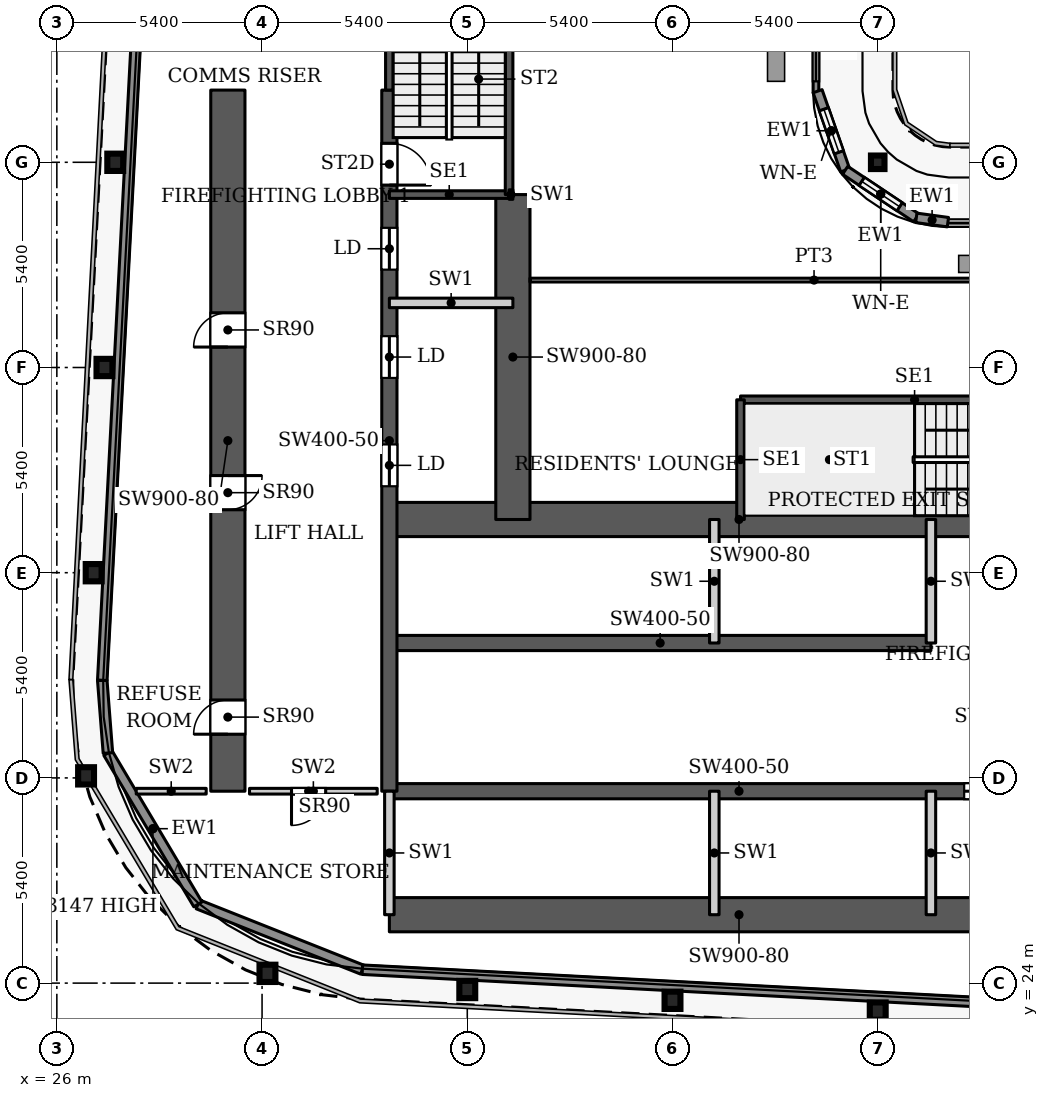
"""IFC4 building model, lengths in metres.
Left out: names, types, materials, properties, quantities, classifications, styles, units other than length and angle.
Written with IfcOpenShell. Run it as: python <this file> out.ifc"""

import sys

from ifc_helpers import new_model, si_unit, direction, frame, frame_2d, origin, origin_2d, place, context, subcontext, project, spatial, rectangle, hollow_rectangle, i_section, extrude, source, transform, mapped, element, fill, save


model = new_model("IFC4")
c1 = context("Model", 3, precision=1e-05, world=origin(), true_north=direction((0.0, 1.0)))
c2 = subcontext(c1, "Body", "Model", "MODEL_VIEW")
j1 = project(units=[si_unit("LENGTHUNIT", "METRE"), si_unit("PLANEANGLEUNIT", "RADIAN")], contexts=[c1])
p1 = place(None, origin())
s1 = spatial("IfcSite", under=j1, at=p1, CompositionType="ELEMENT")
p2 = place(p1, origin())
s2 = spatial("IfcBuilding", under=s1, at=p2, CompositionType="ELEMENT")
p3 = place(p2, frame((0.0, 0.0, 129.2)))
s3 = spatial("IfcBuildingStorey", under=s2, at=p3, CompositionType="ELEMENT", Elevation=129.2)
for number, where, z_axis, x_axis in (
    (1, (47.6, 23.264, 0.0), (0.0, 0.0, 1.0), (1.0, 0.0, 0.0)),
    (2, (42.2, 23.548, 0.0), (0.0, 0.0, 1.0), (1.0, 0.0, 0.0)),
    (3, (36.8, 23.832, 0.0), (0.0, 0.0, 1.0), (1.0, 0.0, 0.0)),
    (4, (31.542, 24.257, 0.0), (0.0, 0.0, 1.0), (1.0, 0.0, 0.0)),
    (5, (26.769, 29.454, 0.0), (0.0, 0.0, 1.0), (1.0, 0.0, 0.0)),
    (6, (26.969, 34.8, 0.0), (0.0, 0.0, 1.0), (1.0, 0.0, 0.0)),
    (7, (27.253, 40.2, 0.0), (0.0, 0.0, 1.0), (1.0, 0.0, 0.0)),
    (8, (27.537, 45.6, 0.0), (0.0, 0.0, 1.0), (1.0, 0.0, 0.0)),
):
    element("IfcColumn", number, at=place(p3, frame(where, z_axis=z_axis, x_axis=x_axis)), inside=s3, PredefinedType="COLUMN", context=c2, shape_type="SweptSolid", body=[
        extrude(i_section(OverallWidth=0.418, OverallDepth=0.455, WebThickness=0.042, FlangeThickness=0.068, FilletRadius=0.014, at=origin_2d()), origin(), (0.0, 0.0, 1.0), 3.9),
    ])
p4 = place(p3, frame((47.6, 45.6, 0.0), z_axis=(0.0, 0.0, 1.0), x_axis=(1.0, 0.0, 0.0)))
e9 = element("IfcColumn", 9, at=p4, inside=s3, PredefinedType="COLUMN", context=c2, shape_type="SweptSolid", body=[
    extrude(hollow_rectangle(XDim=0.356, YDim=0.356, WallThickness=0.016, InnerFilletRadius=0.016, OuterFilletRadius=0.032, at=origin_2d()), origin(), (0.0, 0.0, 1.0), 3.9),
])
p5 = place(p3, frame((34.75, 25.8, 0.0), z_axis=(0.0, 0.0, 1.0), x_axis=(1.0, 0.0, 0.0)))
e10 = element("IfcWall", 10, at=p5, inside=s3, PredefinedType="SHEAR", context=c2, shape_type="SweptSolid", body=[
    extrude(rectangle(XDim=18.4, YDim=0.9, at=frame_2d((9.2, 0.0))), origin(), (0.0, 0.0, 1.0), 3.9),
])
p6 = place(p3, frame((34.75, 29.05, 0.0), z_axis=(0.0, 0.0, 1.0), x_axis=(1.0, 0.0, 0.0)))
e11 = element("IfcWall", 11, at=p6, inside=s3, PredefinedType="SHEAR", context=c2, shape_type="SweptSolid", body=[
    extrude(rectangle(XDim=18.4, YDim=0.4, at=frame_2d((9.2, 0.0))), origin(), (0.0, 0.0, 1.0), 3.9),
])
p7 = place(p6, frame((15.125, 0.0, 0.0)))
e12 = element("IfcOpeningElement", 12, at=p7, cuts=e11, PredefinedType="OPENING", context=c2, shape_type="SweptSolid", body=[
    extrude(rectangle(XDim=1.1, YDim=2.2, at=frame_2d((0.55, 1.1))), frame((0.0, 0.21, 0.0), z_axis=(0.0, -1.0, 0.0), x_axis=(1.0, 0.0, 0.0)), (0.0, 0.0, 1.0), 0.42),
])
p8 = place(p3, frame((34.75, 32.95, 0.0), z_axis=(0.0, 0.0, 1.0), x_axis=(1.0, 0.0, 0.0)))
e13 = element("IfcWall", 13, at=p8, inside=s3, PredefinedType="SHEAR", context=c2, shape_type="SweptSolid", body=[
    extrude(rectangle(XDim=14.25, YDim=0.4, at=frame_2d((7.125, 0.0))), origin(), (0.0, 0.0, 1.0), 3.9),
])
p9 = place(p3, frame((34.75, 36.2, 0.0), z_axis=(0.0, 0.0, 1.0), x_axis=(1.0, 0.0, 0.0)))
e14 = element("IfcWall", 14, at=p9, inside=s3, PredefinedType="SHEAR", context=c2, shape_type="SweptSolid", body=[
    extrude(rectangle(XDim=18.4, YDim=0.9, at=frame_2d((9.2, 0.0))), origin(), (0.0, 0.0, 1.0), 3.9),
])
p10 = place(p9, frame((16.9, 0.0, 0.0)))
e15 = element("IfcOpeningElement", 15, at=p10, cuts=e14, PredefinedType="OPENING", context=c2, shape_type="SweptSolid", body=[
    extrude(rectangle(XDim=1.0, YDim=2.2, at=frame_2d((0.5, 1.1))), frame((0.0, 0.46, 0.0), z_axis=(0.0, -1.0, 0.0), x_axis=(1.0, 0.0, 0.0)), (0.0, 0.0, 1.0), 0.92),
])
p11 = place(p3, frame((34.75, 29.05, 0.0), z_axis=(0.0, 0.0, 1.0), x_axis=(0.0, 1.0, 0.0)))
e16 = element("IfcWall", 16, at=p11, inside=s3, PredefinedType="SHEAR", context=c2, shape_type="SweptSolid", body=[
    extrude(rectangle(XDim=18.45, YDim=0.4, at=frame_2d((9.225, 0.0))), origin(), (0.0, 0.0, 1.0), 3.9),
])
p12 = place(p11, frame((8.025, 0.0, 0.0)))
e17 = element("IfcOpeningElement", 17, at=p12, cuts=e16, PredefinedType="OPENING", context=c2, shape_type="SweptSolid", body=[
    extrude(rectangle(XDim=1.1, YDim=2.2, at=frame_2d((0.55, 1.1))), frame((0.0, 0.21, 0.0), z_axis=(0.0, -1.0, 0.0), x_axis=(1.0, 0.0, 0.0)), (0.0, 0.0, 1.0), 0.42),
])
p13 = place(p11, frame((10.875, 0.0, 0.0)))
e18 = element("IfcOpeningElement", 18, at=p13, cuts=e16, PredefinedType="OPENING", context=c2, shape_type="SweptSolid", body=[
    extrude(rectangle(XDim=1.1, YDim=2.2, at=frame_2d((0.55, 1.1))), frame((0.0, 0.21, 0.0), z_axis=(0.0, -1.0, 0.0), x_axis=(1.0, 0.0, 0.0)), (0.0, 0.0, 1.0), 0.42),
])
p14 = place(p11, frame((13.725, 0.0, 0.0)))
e19 = element("IfcOpeningElement", 19, at=p14, cuts=e16, PredefinedType="OPENING", context=c2, shape_type="SweptSolid", body=[
    extrude(rectangle(XDim=1.1, YDim=2.2, at=frame_2d((0.55, 1.1))), frame((0.0, 0.21, 0.0), z_axis=(0.0, -1.0, 0.0), x_axis=(1.0, 0.0, 0.0)), (0.0, 0.0, 1.0), 0.42),
])
p15 = place(p11, frame((15.95, 0.0, 0.0)))
e20 = element("IfcOpeningElement", 20, at=p15, cuts=e16, PredefinedType="OPENING", context=c2, shape_type="SweptSolid", body=[
    extrude(rectangle(XDim=1.1, YDim=2.2, at=frame_2d((0.55, 1.1))), frame((0.0, 0.21, 0.0), z_axis=(0.0, -1.0, 0.0), x_axis=(1.0, 0.0, 0.0)), (0.0, 0.0, 1.0), 0.42),
])
p16 = place(p3, frame((38.0, 36.2, 0.0), z_axis=(0.0, 0.0, 1.0), x_axis=(0.0, 1.0, 0.0)))
e21 = element("IfcWall", 21, at=p16, inside=s3, PredefinedType="SHEAR", context=c2, shape_type="SweptSolid", body=[
    extrude(rectangle(XDim=8.55, YDim=0.9, at=frame_2d((4.275, 0.0))), origin(), (0.0, 0.0, 1.0), 3.9),
])
p17 = place(p3, frame((30.5, 29.05, 0.0), z_axis=(0.0, 0.0, 1.0), x_axis=(0.0, 1.0, 0.0)))
e22 = element("IfcWall", 22, at=p17, inside=s3, PredefinedType="SHEAR", context=c2, shape_type="SweptSolid", body=[
    extrude(rectangle(XDim=18.45, YDim=0.9, at=frame_2d((9.225, 0.0))), origin(), (0.0, 0.0, 1.0), 3.9),
])
p18 = place(p17, frame((1.5, 0.0, 0.0)))
e23 = element("IfcOpeningElement", 23, at=p18, cuts=e22, PredefinedType="OPENING", context=c2, shape_type="SweptSolid", body=[
    extrude(rectangle(XDim=0.9, YDim=2.2, at=frame_2d((0.45, 1.1))), frame((0.0, 0.46, 0.0), z_axis=(0.0, -1.0, 0.0), x_axis=(1.0, 0.0, 0.0)), (0.0, 0.0, 1.0), 0.92),
])
p19 = place(p17, frame((7.406, 0.0, 0.0)))
e24 = element("IfcOpeningElement", 24, at=p19, cuts=e22, PredefinedType="OPENING", context=c2, shape_type="SweptSolid", body=[
    extrude(rectangle(XDim=0.9, YDim=2.2, at=frame_2d((0.45, 1.1))), frame((0.0, 0.46, 0.0), z_axis=(0.0, -1.0, 0.0), x_axis=(1.0, 0.0, 0.0)), (0.0, 0.0, 1.0), 0.92),
])
p20 = place(p17, frame((11.688, 0.0, 0.0)))
e25 = element("IfcOpeningElement", 25, at=p20, cuts=e22, PredefinedType="OPENING", context=c2, shape_type="SweptSolid", body=[
    extrude(rectangle(XDim=0.9, YDim=2.2, at=frame_2d((0.45, 1.1))), frame((0.0, 0.46, 0.0), z_axis=(0.0, -1.0, 0.0), x_axis=(1.0, 0.0, 0.0)), (0.0, 0.0, 1.0), 0.92),
])
p21 = place(p3, frame((34.039, 24.353, 0.0), z_axis=(0.0, 0.0, 1.0), x_axis=(-0.929352825399, 0.369192803184, 0.0)))
e26 = element("IfcWall", 26, at=p21, inside=s3, PredefinedType="SOLIDWALL", context=c2, shape_type="SweptSolid", body=[
    extrude(rectangle(XDim=4.656, YDim=0.25, at=frame_2d((2.328, 0.0))), origin(), (0.0, 0.0, 1.0), 3.75),
])
p22 = place(p3, frame((29.712, 26.072, 0.0), z_axis=(0.0, 0.0, 1.0), x_axis=(-0.511028049012, 0.859564036662, 0.0)))
e27 = element("IfcWall", 27, at=p22, inside=s3, PredefinedType="SOLIDWALL", context=c2, shape_type="SweptSolid", body=[
    extrude(rectangle(XDim=4.634, YDim=0.25, at=frame_2d((2.317, 0.0))), origin(), (0.0, 0.0, 1.0), 3.147),
])
p23 = place(p3, frame((27.344, 30.055, 0.0), z_axis=(0.0, 0.0, 1.0), x_axis=(-0.077571675317, 0.99698677784, 0.0)))
e28 = element("IfcWall", 28, at=p23, inside=s3, PredefinedType="SOLIDWALL", context=c2, shape_type="SweptSolid", body=[
    extrude(rectangle(XDim=1.92, YDim=0.25, at=frame_2d((0.96, 0.0))), origin(), (0.0, 0.0, 1.0), 3.75),
])
p24 = place(p3, frame((27.195, 31.969, 0.0), z_axis=(0.0, 0.0, 1.0), x_axis=(0.052554995867, 0.998618031286, 0.0)))
e29 = element("IfcWall", 29, at=p24, inside=s3, PredefinedType="SOLIDWALL", context=c2, shape_type="SweptSolid", body=[
    extrude(rectangle(XDim=66.787, YDim=0.25, at=frame_2d((33.394, 0.0))), origin(), (0.0, 0.0, 1.0), 3.75),
])
p25 = place(p3, frame((45.975, 49.83, 0.0), z_axis=(0.0, 0.0, 1.0), x_axis=(0.0, -1.0, 0.0)))
e30 = element("IfcWall", 30, at=p25, inside=s3, PredefinedType="SOLIDWALL", context=c2, shape_type="SweptSolid", body=[
    extrude(rectangle(XDim=2.4, YDim=0.15, at=frame_2d((1.2, 0.0))), origin(), (0.0, 0.0, 1.0), 3.75),
])
p26 = place(p25, frame((0.3, 0.0, 0.0)))
e31 = element("IfcOpeningElement", 31, at=p26, cuts=e30, PredefinedType="OPENING", context=c2, shape_type="SweptSolid", body=[
    extrude(rectangle(XDim=1.8, YDim=2.4, at=frame_2d((0.9, 1.2))), frame((0.0, 0.085, 0.0), z_axis=(0.0, -1.0, 0.0), x_axis=(1.0, 0.0, 0.0)), (0.0, 0.0, 1.0), 0.17),
])
p27 = place(p3, frame((46.018, 47.471, 0.0), z_axis=(0.0, 0.0, 1.0), x_axis=(0.328791208903, -0.944402637093, 0.0)))
e32 = element("IfcWall", 32, at=p27, inside=s3, PredefinedType="SOLIDWALL", context=c2, shape_type="SweptSolid", body=[
    extrude(rectangle(XDim=2.205, YDim=0.25, at=frame_2d((1.102, 0.0))), origin(), (0.0, 0.0, 1.0), 3.75),
])
p28 = place(p27, frame((0.503, 0.0, 0.6)))
e33 = element("IfcOpeningElement", 33, at=p28, cuts=e32, PredefinedType="OPENING", context=c2, shape_type="SweptSolid", body=[
    extrude(rectangle(XDim=1.2, YDim=2.1, at=frame_2d((0.6, 1.05))), frame((0.0, 0.135, 0.0), z_axis=(0.0, -1.0, 0.0), x_axis=(1.0, 0.0, 0.0)), (0.0, 0.0, 1.0), 0.27),
])
p29 = place(p3, frame((46.743, 45.389, 0.0), z_axis=(0.0, 0.0, 1.0), x_axis=(0.831449265529, -0.555600682912, 0.0)))
e34 = element("IfcWall", 34, at=p29, inside=s3, PredefinedType="SOLIDWALL", context=c2, shape_type="SweptSolid", body=[
    extrude(rectangle(XDim=2.251, YDim=0.25, at=frame_2d((1.126, 0.0))), origin(), (0.0, 0.0, 1.0), 3.75),
])
p30 = place(p29, frame((0.525, 0.0, 0.6)))
e35 = element("IfcOpeningElement", 35, at=p30, cuts=e34, PredefinedType="OPENING", context=c2, shape_type="SweptSolid", body=[
    extrude(rectangle(XDim=1.2, YDim=2.1, at=frame_2d((0.6, 1.05))), frame((0.0, 0.135, 0.0), z_axis=(0.0, -1.0, 0.0), x_axis=(1.0, 0.0, 0.0)), (0.0, 0.0, 1.0), 0.27),
])
p31 = place(p3, frame((48.615, 44.138, 0.0), z_axis=(0.0, 0.0, 1.0), x_axis=(0.990741504246, -0.135761819977, 0.0)))
e36 = element("IfcWall", 36, at=p31, inside=s3, PredefinedType="SOLIDWALL", context=c2, shape_type="SweptSolid", body=[
    extrude(rectangle(XDim=0.84, YDim=0.25, at=frame_2d((0.42, 0.0))), origin(), (0.0, 0.0, 1.0), 3.75),
])
p32 = place(p3, frame((100.586, 20.85, 0.0), z_axis=(0.0, 0.0, 1.0), x_axis=(-0.99861746497, 0.052565755559, 0.0)))
e37 = element("IfcWall", 37, at=p32, inside=s3, PredefinedType="SOLIDWALL", context=c2, shape_type="SweptSolid", body=[
    extrude(rectangle(XDim=66.639, YDim=0.25, at=frame_2d((33.319, 0.0))), origin(), (0.0, 0.0, 1.0), 3.75),
])
p33 = place(p3, frame((43.99, 39.35, 0.0), z_axis=(0.0, 0.0, 1.0), x_axis=(1.0, 0.0, 0.0)))
e38 = element("IfcWall", 38, at=p33, inside=s3, PredefinedType="SHEAR", context=c2, shape_type="SweptSolid", body=[
    extrude(rectangle(XDim=9.16, YDim=0.2, at=frame_2d((4.58, 0.0))), origin(), (0.0, 0.0, 1.0), 3.9),
])
p34 = place(p3, frame((43.99, 36.2, 0.0), z_axis=(0.0, 0.0, 1.0), x_axis=(0.0, 1.0, 0.0)))
e39 = element("IfcWall", 39, at=p34, inside=s3, PredefinedType="SHEAR", context=c2, shape_type="SweptSolid", body=[
    extrude(rectangle(XDim=3.15, YDim=0.2, at=frame_2d((1.575, 0.0))), origin(), (0.0, 0.0, 1.0), 3.9),
])
p35 = place(p3, frame((34.75, 44.75, 0.0), z_axis=(0.0, 0.0, 1.0), x_axis=(1.0, 0.0, 0.0)))
e40 = element("IfcWall", 40, at=p35, inside=s3, PredefinedType="SHEAR", context=c2, shape_type="SweptSolid", body=[
    extrude(rectangle(XDim=3.15, YDim=0.2, at=frame_2d((1.575, 0.0))), origin(), (0.0, 0.0, 1.0), 3.9),
])
p36 = place(p3, frame((34.75, 47.5, 0.0), z_axis=(0.0, 0.0, 1.0), x_axis=(0.0, 1.0, 0.0)))
e41 = element("IfcWall", 41, at=p36, inside=s3, PredefinedType="SHEAR", context=c2, shape_type="SweptSolid", body=[
    extrude(rectangle(XDim=6.41, YDim=0.2, at=frame_2d((3.205, 0.0))), origin(), (0.0, 0.0, 1.0), 3.9),
])
p37 = place(p3, frame((37.9, 44.75, 0.0), z_axis=(0.0, 0.0, 1.0), x_axis=(0.0, 1.0, 0.0)))
e42 = element("IfcWall", 42, at=p37, inside=s3, PredefinedType="SHEAR", context=c2, shape_type="SweptSolid", body=[
    extrude(rectangle(XDim=9.16, YDim=0.2, at=frame_2d((4.58, 0.0))), origin(), (0.0, 0.0, 1.0), 3.9),
])
for number, where, z_axis, x_axis in (
    (43, (34.75, 25.8, 0.0), (0.0, 0.0, 1.0), (0.0, 1.0, 0.0)),
    (44, (43.3, 25.8, 0.0), (0.0, 0.0, 1.0), (0.0, 1.0, 0.0)),
    (45, (43.3, 32.95, 0.0), (0.0, 0.0, 1.0), (0.0, 1.0, 0.0)),
    (46, (49.0, 25.8, 0.0), (0.0, 0.0, 1.0), (0.0, 1.0, 0.0)),
    (47, (49.0, 32.95, 0.0), (0.0, 0.0, 1.0), (0.0, 1.0, 0.0)),
    (48, (34.75, 41.9, 0.0), (0.0, 0.0, 1.0), (1.0, 0.0, 0.0)),
):
    element("IfcWall", number, at=place(p3, frame(where, z_axis=z_axis, x_axis=x_axis)), inside=s3, PredefinedType="PARTITIONING", context=c2, shape_type="SweptSolid", body=[
        extrude(rectangle(XDim=3.25, YDim=0.25, at=frame_2d((1.625, 0.0))), origin(), (0.0, 0.0, 1.0), 3.9),
    ])
p38 = place(p3, frame((37.9, 44.75, 0.0), z_axis=(0.0, 0.0, 1.0), x_axis=(1.0, 0.0, 0.0)))
e49 = element("IfcWall", 49, at=p38, inside=s3, PredefinedType="PARTITIONING", context=c2, shape_type="SweptSolid", body=[
    extrude(rectangle(XDim=0.1, YDim=0.25, at=frame_2d((0.05, 0.0))), origin(), (0.0, 0.0, 1.0), 3.9),
])
p39 = place(p3, frame((28.089, 29.05, 0.0), z_axis=(0.0, 0.0, 1.0), x_axis=(1.0, 0.0, 0.0)))
e50 = element("IfcWall", 50, at=p39, inside=s3, PredefinedType="PARTITIONING", context=c2, shape_type="SweptSolid", body=[
    extrude(rectangle(XDim=1.841, YDim=0.15, at=frame_2d((0.92, 0.0))), origin(), (0.0, 0.0, 1.0), 3.9),
])
p40 = place(p3, frame((31.07, 29.05, 0.0), z_axis=(0.0, 0.0, 1.0), x_axis=(1.0, 0.0, 0.0)))
e51 = element("IfcWall", 51, at=p40, inside=s3, PredefinedType="PARTITIONING", context=c2, shape_type="SweptSolid", body=[
    extrude(rectangle(XDim=3.36, YDim=0.15, at=frame_2d((1.68, 0.0))), origin(), (0.0, 0.0, 1.0), 3.9),
])
p41 = place(p40, frame((1.105, 0.0, 0.0)))
e52 = element("IfcOpeningElement", 52, at=p41, cuts=e51, PredefinedType="OPENING", context=c2, shape_type="SweptSolid", body=[
    extrude(rectangle(XDim=0.9, YDim=2.2, at=frame_2d((0.45, 1.1))), frame((0.0, 0.085, 0.0), z_axis=(0.0, -1.0, 0.0), x_axis=(1.0, 0.0, 0.0)), (0.0, 0.0, 1.0), 0.17),
])
p42 = place(p3, frame((38.449, 42.5, 0.0), z_axis=(0.0, 0.0, 1.0), x_axis=(1.0, 0.0, 0.0)))
e53 = element("IfcWall", 53, at=p42, inside=s3, PredefinedType="PARTITIONING", context=c2, shape_type="SweptSolid", body=[
    extrude(rectangle(XDim=14.951, YDim=0.1, at=frame_2d((7.476, 0.0))), origin(), (0.0, 0.0, 1.0), 3.6),
])
m1 = source(origin(), c2, "Body", "SweptSolid", [
    extrude(rectangle(XDim=1.8, YDim=2.4, at=frame_2d((0.9, 1.2))), frame((0.0, 0.025, 0.0), z_axis=(0.0, -1.0, 0.0), x_axis=(1.0, 0.0, 0.0)), (0.0, 0.0, 1.0), 0.05),
])
p43 = place(p26, origin())
e54 = element("IfcDoor", 54, at=p43, inside=s3, OperationType="SLIDING_TO_LEFT", PredefinedType="DOOR", context=c2, shape_type="MappedRepresentation", body=[
    mapped(m1, transform((0.0, 0.0, 0.0), x_axis=(1.0, 0.0, 0.0), y_axis=(0.0, 1.0, 0.0), z_axis=(0.0, 0.0, 1.0), scale=1.0)),
])
fill(e31, e54)
m2 = source(origin(), c2, "Body", "SweptSolid", [
    extrude(rectangle(XDim=1.2, YDim=2.1, at=frame_2d((0.6, 1.05))), frame((0.0, 0.03, 0.0), z_axis=(0.0, -1.0, 0.0), x_axis=(1.0, 0.0, 0.0)), (0.0, 0.0, 1.0), 0.06),
])
p44 = place(p28, origin())
e55 = element("IfcWindow", 55, at=p44, inside=s3, PartitioningType="SINGLE_PANEL", PredefinedType="WINDOW", context=c2, shape_type="MappedRepresentation", body=[
    mapped(m2, transform((0.0, 0.0, 0.0), x_axis=(1.0, 0.0, 0.0), y_axis=(0.0, 1.0, 0.0), z_axis=(0.0, 0.0, 1.0), scale=1.0)),
])
fill(e33, e55)
p45 = place(p30, origin())
e56 = element("IfcWindow", 56, at=p45, inside=s3, PartitioningType="SINGLE_PANEL", PredefinedType="WINDOW", context=c2, shape_type="MappedRepresentation", body=[
    mapped(m2, transform((0.0, 0.0, 0.0), x_axis=(1.0, 0.0, 0.0), y_axis=(0.0, 1.0, 0.0), z_axis=(0.0, 0.0, 1.0), scale=1.0)),
])
fill(e35, e56)
m3 = source(origin(), c2, "Body", "SweptSolid", [
    extrude(rectangle(XDim=1.1, YDim=2.2, at=frame_2d((0.55, 1.1))), frame((0.0, 0.025, 0.0), z_axis=(0.0, -1.0, 0.0), x_axis=(1.0, 0.0, 0.0)), (0.0, 0.0, 1.0), 0.05),
])
p46 = place(p12, origin())
e57 = element("IfcDoor", 57, at=p46, inside=s3, OperationType="SLIDING_TO_LEFT", PredefinedType="DOOR", context=c2, shape_type="MappedRepresentation", body=[
    mapped(m3, transform((0.0, 0.0, 0.0), x_axis=(1.0, 0.0, 0.0), y_axis=(0.0, 1.0, 0.0), z_axis=(0.0, 0.0, 1.0), scale=1.0)),
])
fill(e17, e57)
p47 = place(p13, origin())
e58 = element("IfcDoor", 58, at=p47, inside=s3, OperationType="SLIDING_TO_LEFT", PredefinedType="DOOR", context=c2, shape_type="MappedRepresentation", body=[
    mapped(m3, transform((0.0, 0.0, 0.0), x_axis=(1.0, 0.0, 0.0), y_axis=(0.0, 1.0, 0.0), z_axis=(0.0, 0.0, 1.0), scale=1.0)),
])
fill(e18, e58)
p48 = place(p14, origin())
e59 = element("IfcDoor", 59, at=p48, inside=s3, OperationType="SLIDING_TO_LEFT", PredefinedType="DOOR", context=c2, shape_type="MappedRepresentation", body=[
    mapped(m3, transform((0.0, 0.0, 0.0), x_axis=(1.0, 0.0, 0.0), y_axis=(0.0, 1.0, 0.0), z_axis=(0.0, 0.0, 1.0), scale=1.0)),
])
fill(e19, e59)
p49 = place(p7, origin())
e60 = element("IfcDoor", 60, at=p49, inside=s3, OperationType="SLIDING_TO_LEFT", PredefinedType="DOOR", context=c2, shape_type="MappedRepresentation", body=[
    mapped(m3, transform((0.0, 0.0, 0.0), x_axis=(1.0, 0.0, 0.0), y_axis=(0.0, 1.0, 0.0), z_axis=(0.0, 0.0, 1.0), scale=1.0)),
])
fill(e12, e60)
m4 = source(origin(), c2, "Body", "SweptSolid", [
    extrude(rectangle(XDim=0.9, YDim=2.2, at=frame_2d((0.45, 1.1))), frame((0.0, 0.025, 0.0), z_axis=(0.0, -1.0, 0.0), x_axis=(1.0, 0.0, 0.0)), (0.0, 0.0, 1.0), 0.05),
])
p50 = place(p18, origin())
e61 = element("IfcDoor", 61, at=p50, inside=s3, OperationType="SINGLE_SWING_LEFT", PredefinedType="DOOR", context=c2, shape_type="MappedRepresentation", body=[
    mapped(m4, transform((0.0, 0.0, 0.0), x_axis=(1.0, 0.0, 0.0), y_axis=(0.0, 1.0, 0.0), z_axis=(0.0, 0.0, 1.0), scale=1.0)),
])
fill(e23, e61)
p51 = place(p19, origin())
e62 = element("IfcDoor", 62, at=p51, inside=s3, OperationType="SINGLE_SWING_RIGHT", PredefinedType="DOOR", context=c2, shape_type="MappedRepresentation", body=[
    mapped(m4, transform((0.0, 0.0, 0.0), x_axis=(1.0, 0.0, 0.0), y_axis=(0.0, 1.0, 0.0), z_axis=(0.0, 0.0, 1.0), scale=1.0)),
])
fill(e24, e62)
p52 = place(p20, origin())
e63 = element("IfcDoor", 63, at=p52, inside=s3, OperationType="SINGLE_SWING_LEFT", PredefinedType="DOOR", context=c2, shape_type="MappedRepresentation", body=[
    mapped(m4, transform((0.0, 0.0, 0.0), x_axis=(1.0, 0.0, 0.0), y_axis=(0.0, 1.0, 0.0), z_axis=(0.0, 0.0, 1.0), scale=1.0)),
])
fill(e25, e63)
p53 = place(p41, origin())
e64 = element("IfcDoor", 64, at=p53, inside=s3, OperationType="SINGLE_SWING_RIGHT", PredefinedType="DOOR", context=c2, shape_type="MappedRepresentation", body=[
    mapped(m4, transform((0.0, 0.0, 0.0), x_axis=(1.0, 0.0, 0.0), y_axis=(0.0, 1.0, 0.0), z_axis=(0.0, 0.0, 1.0), scale=1.0)),
])
fill(e52, e64)
m5 = source(origin(), c2, "Body", "SweptSolid", [
    extrude(rectangle(XDim=1.1, YDim=2.2, at=frame_2d((0.55, 1.1))), frame((0.0, 0.025, 0.0), z_axis=(0.0, -1.0, 0.0), x_axis=(1.0, 0.0, 0.0)), (0.0, 0.0, 1.0), 0.05),
])
p54 = place(p15, origin())
e65 = element("IfcDoor", 65, at=p54, inside=s3, OperationType="SINGLE_SWING_RIGHT", PredefinedType="DOOR", context=c2, shape_type="MappedRepresentation", body=[
    mapped(m5, transform((0.0, 0.0, 0.0), x_axis=(1.0, 0.0, 0.0), y_axis=(0.0, 1.0, 0.0), z_axis=(0.0, 0.0, 1.0), scale=1.0)),
])
fill(e20, e65)
save(model, sys.argv[1])
